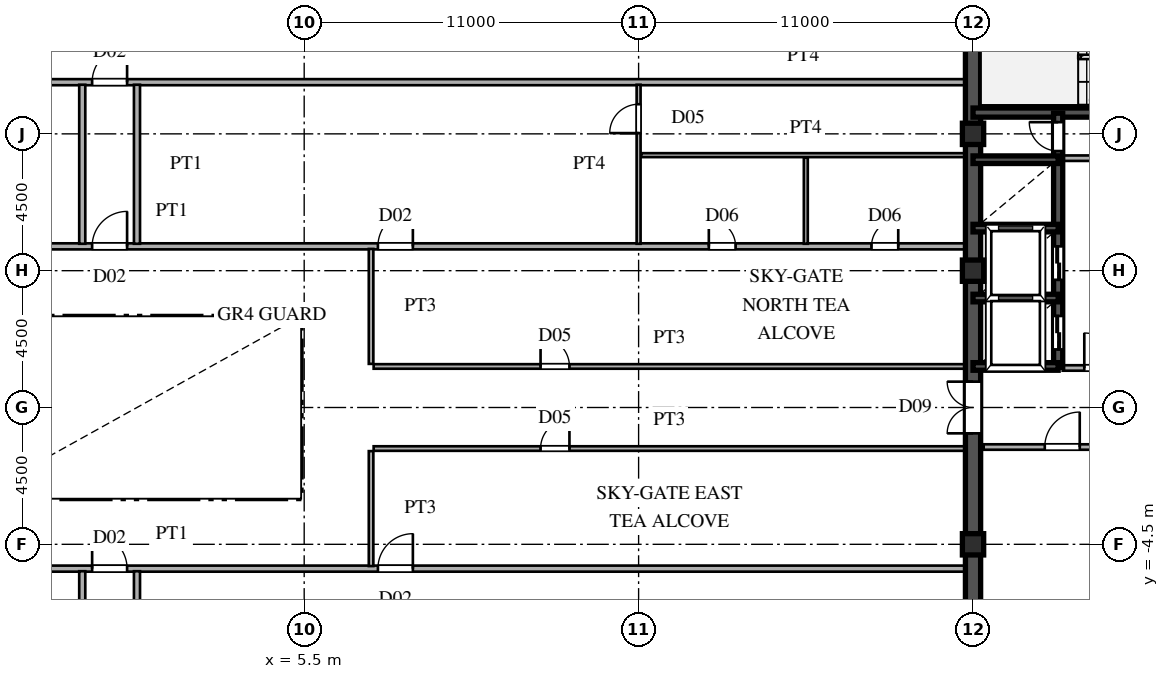
"""IFC4 building model, lengths in metres.
Left out: names, types, materials, properties, quantities, classifications, styles, units other than length and angle.
Written with IfcOpenShell. Run it as: python <this file> out.ifc"""

import sys

from ifc_helpers import new_model, si_unit, direction, frame, frame_2d, origin, origin_2d, place, context, subcontext, project, spatial, rectangle, hollow_rectangle, extrude, source, transform, mapped, element, fill, save


model = new_model("IFC4")
c1 = context("Model", 3, precision=1e-05, world=origin(), true_north=direction((0.0, 1.0)))
c2 = subcontext(c1, "Body", "Model", "MODEL_VIEW")
j1 = project(units=[si_unit("LENGTHUNIT", "METRE"), si_unit("PLANEANGLEUNIT", "RADIAN")], contexts=[c1])
p1 = place(None, origin())
s1 = spatial("IfcSite", under=j1, at=p1, CompositionType="ELEMENT")
p2 = place(p1, origin())
s2 = spatial("IfcBuilding", under=s1, at=p2, CompositionType="ELEMENT")
p3 = place(p2, frame((0.0, 0.0, 234.6)))
s3 = spatial("IfcBuildingStorey", under=s2, at=p3, CompositionType="ELEMENT", Elevation=234.6)
m1 = source(origin(), c2, "Body", "SweptSolid", [
    extrude(hollow_rectangle(XDim=0.7, YDim=0.7, WallThickness=0.03, at=origin_2d()), origin(), (0.0, 0.0, 1.0), 4.8),
])
for number, where, z_axis, x_axis in (
    (1, (27.5, -4.5, 0.0), (0.0, 0.0, 1.0), (1.0, 0.0, 0.0)),
    (2, (27.5, 4.5, 0.0), (0.0, 0.0, 1.0), (1.0, 0.0, 0.0)),
    (3, (27.5, 9.0, 0.0), (0.0, 0.0, 1.0), (1.0, 0.0, 0.0)),
):
    element("IfcColumn", number, at=place(p3, frame(where, z_axis=z_axis, x_axis=x_axis)), inside=s3, PredefinedType="COLUMN", context=c2, shape_type="MappedRepresentation", body=[
        mapped(m1, transform((0.0, 0.0, 0.0), scale=1.0)),
    ])
for number, where, z_axis, x_axis in (
    (4, (27.5, -13.5, 0.0), (0.0, 0.0, 1.0), (0.0, 1.0, 0.0)),
    (5, (27.5, 1.3, 0.0), (0.0, 0.0, 1.0), (0.0, 1.0, 0.0)),
):
    element("IfcWall", number, at=place(p3, frame(where, z_axis=z_axis, x_axis=x_axis)), inside=s3, PredefinedType="SHEAR", context=c2, shape_type="SweptSolid", body=[
        extrude(rectangle(XDim=12.2, YDim=0.5, at=frame_2d((6.1, 0.0))), origin(), (0.0, 0.0, 1.0), 4.58),
    ])
p4 = place(p3, frame((27.5, -1.3, 0.0), z_axis=(0.0, 0.0, 1.0), x_axis=(0.0, 1.0, 0.0)))
e6 = element("IfcWall", 6, at=p4, inside=s3, PredefinedType="SHEAR", context=c2, shape_type="SweptSolid", body=[
    extrude(rectangle(XDim=2.6, YDim=0.5, at=frame_2d((1.3, 0.0))), origin(), (0.0, 0.0, 1.0), 4.58),
])
p5 = place(p4, frame((0.45, 0.0, 0.0)))
e7 = element("IfcOpeningElement", 7, at=p5, cuts=e6, PredefinedType="OPENING", context=c2, shape_type="SweptSolid", body=[
    extrude(rectangle(XDim=1.7, YDim=2.35, at=frame_2d((0.85, 1.175))), frame((0.0, 0.26, 0.0), z_axis=(0.0, -1.0, 0.0), x_axis=(1.0, 0.0, 0.0)), (0.0, 0.0, 1.0), 0.52),
])
p6 = place(p3, frame((27.5, 9.7, 0.0), z_axis=(0.0, 0.0, 1.0), x_axis=(1.0, 0.0, 0.0)))
e8 = element("IfcWall", 8, at=p6, inside=s3, PredefinedType="SHEAR", context=c2, shape_type="SweptSolid", body=[
    extrude(rectangle(XDim=9.0, YDim=0.3, at=frame_2d((4.5, 0.0))), origin(), (0.0, 0.0, 1.0), 4.58),
])
p7 = place(p6, frame((7.3, 0.0, 0.0)))
e9 = element("IfcOpeningElement", 9, at=p7, cuts=e8, PredefinedType="OPENING", context=c2, shape_type="SweptSolid", body=[
    extrude(rectangle(XDim=1.1, YDim=2.2, at=frame_2d((0.55, 1.1))), frame((0.0, 0.16, 0.0), z_axis=(0.0, -1.0, 0.0), x_axis=(1.0, 0.0, 0.0)), (0.0, 0.0, 1.0), 0.32),
])
for number, where, z_axis, x_axis in (
    (10, (27.5, 1.35, 0.0), (0.0, 0.0, 1.0), (1.0, 0.0, 0.0)),
    (11, (27.5, 3.6, 0.0), (0.0, 0.0, 1.0), (1.0, 0.0, 0.0)),
    (12, (27.5, 5.9, 0.0), (0.0, 0.0, 1.0), (1.0, 0.0, 0.0)),
    (13, (27.5, 8.15, 0.0), (0.0, 0.0, 1.0), (1.0, 0.0, 0.0)),
):
    element("IfcWall", number, at=place(p3, frame(where, z_axis=z_axis, x_axis=x_axis)), inside=s3, PredefinedType="SHEAR", context=c2, shape_type="SweptSolid", body=[
        extrude(rectangle(XDim=2.8, YDim=0.25, at=frame_2d((1.4, 0.0))), origin(), (0.0, 0.0, 1.0), 4.58),
    ])
p8 = place(p3, frame((30.3, 1.32, 0.0), z_axis=(0.0, 0.0, 1.0), x_axis=(0.0, 1.0, 0.0)))
e14 = element("IfcWall", 14, at=p8, inside=s3, PredefinedType="SHEAR", context=c2, shape_type="SweptSolid", body=[
    extrude(rectangle(XDim=2.28, YDim=0.3, at=frame_2d((1.14, 0.0))), origin(), (0.0, 0.0, 1.0), 4.58),
])
p9 = place(p8, frame((0.59, 0.0, 0.0)))
e15 = element("IfcOpeningElement", 15, at=p9, cuts=e14, PredefinedType="OPENING", context=c2, shape_type="SweptSolid", body=[
    extrude(rectangle(XDim=1.1, YDim=2.2, at=frame_2d((0.55, 1.1))), frame((0.0, 0.16, 0.0), z_axis=(0.0, -1.0, 0.0), x_axis=(1.0, 0.0, 0.0)), (0.0, 0.0, 1.0), 0.32),
])
p10 = place(p3, frame((30.3, 3.6, 0.0), z_axis=(0.0, 0.0, 1.0), x_axis=(0.0, 1.0, 0.0)))
e16 = element("IfcWall", 16, at=p10, inside=s3, PredefinedType="SHEAR", context=c2, shape_type="SweptSolid", body=[
    extrude(rectangle(XDim=2.3, YDim=0.3, at=frame_2d((1.15, 0.0))), origin(), (0.0, 0.0, 1.0), 4.58),
])
p11 = place(p10, frame((0.6, 0.0, 0.0)))
e17 = element("IfcOpeningElement", 17, at=p11, cuts=e16, PredefinedType="OPENING", context=c2, shape_type="SweptSolid", body=[
    extrude(rectangle(XDim=1.1, YDim=2.2, at=frame_2d((0.55, 1.1))), frame((0.0, 0.16, 0.0), z_axis=(0.0, -1.0, 0.0), x_axis=(1.0, 0.0, 0.0)), (0.0, 0.0, 1.0), 0.32),
])
p12 = place(p3, frame((30.3, 5.9, 0.0), z_axis=(0.0, 0.0, 1.0), x_axis=(0.0, 1.0, 0.0)))
e18 = element("IfcWall", 18, at=p12, inside=s3, PredefinedType="SHEAR", context=c2, shape_type="SweptSolid", body=[
    extrude(rectangle(XDim=2.25, YDim=0.3, at=frame_2d((1.125, 0.0))), origin(), (0.0, 0.0, 1.0), 4.58),
])
p13 = place(p3, frame((30.3, 8.15, 0.0), z_axis=(0.0, 0.0, 1.0), x_axis=(0.0, 1.0, 0.0)))
e19 = element("IfcWall", 19, at=p13, inside=s3, PredefinedType="SHEAR", context=c2, shape_type="SweptSolid", body=[
    extrude(rectangle(XDim=1.53, YDim=0.3, at=frame_2d((0.765, 0.0))), origin(), (0.0, 0.0, 1.0), 4.58),
])
p14 = place(p13, frame((0.285, 0.0, 0.0)))
e20 = element("IfcOpeningElement", 20, at=p14, cuts=e19, PredefinedType="OPENING", context=c2, shape_type="SweptSolid", body=[
    extrude(rectangle(XDim=0.95, YDim=2.15, at=frame_2d((0.475, 1.075))), frame((0.0, 0.16, 0.0), z_axis=(0.0, -1.0, 0.0), x_axis=(1.0, 0.0, 0.0)), (0.0, 0.0, 1.0), 0.32),
])
p15 = place(p3, frame((30.45, 8.2, 0.0), z_axis=(0.0, 0.0, 1.0), x_axis=(1.0, 0.0, 0.0)))
e21 = element("IfcWall", 21, at=p15, inside=s3, PredefinedType="PARTITIONING", context=c2, shape_type="SweptSolid", body=[
    extrude(rectangle(XDim=5.7, YDim=0.18, at=frame_2d((2.85, 0.0))), origin(), (0.0, 0.0, 1.0), 4.58),
])
p16 = place(p3, frame((27.85, -1.3, 0.0), z_axis=(0.0, 0.0, 1.0), x_axis=(1.0, 0.0, 0.0)))
e22 = element("IfcWall", 22, at=p16, inside=s3, PredefinedType="PARTITIONING", context=c2, shape_type="SweptSolid", body=[
    extrude(rectangle(XDim=5.17, YDim=0.18, at=frame_2d((2.585, 0.0))), origin(), (0.0, 0.0, 1.0), 4.58),
])
p17 = place(p16, frame((2.01, 0.0, 0.0)))
e23 = element("IfcOpeningElement", 23, at=p17, cuts=e22, PredefinedType="OPENING", context=c2, shape_type="SweptSolid", body=[
    extrude(rectangle(XDim=1.15, YDim=2.2, at=frame_2d((0.575, 1.1))), frame((0.0, 0.1, 0.0), z_axis=(0.0, -1.0, 0.0), x_axis=(1.0, 0.0, 0.0)), (0.0, 0.0, 1.0), 0.2),
])
p18 = place(p3, frame((30.45, 1.3, 0.0), z_axis=(0.0, 0.0, 1.0), x_axis=(1.0, 0.0, 0.0)))
e24 = element("IfcWall", 24, at=p18, inside=s3, PredefinedType="PARTITIONING", context=c2, shape_type="SweptSolid", body=[
    extrude(rectangle(XDim=2.57, YDim=0.18, at=frame_2d((1.285, 0.0))), origin(), (0.0, 0.0, 1.0), 4.58),
])
p19 = place(p18, frame((0.71, 0.0, 0.0)))
e25 = element("IfcOpeningElement", 25, at=p19, cuts=e24, PredefinedType="OPENING", context=c2, shape_type="SweptSolid", body=[
    extrude(rectangle(XDim=1.15, YDim=2.2, at=frame_2d((0.575, 1.1))), frame((0.0, 0.1, 0.0), z_axis=(0.0, -1.0, 0.0), x_axis=(1.0, 0.0, 0.0)), (0.0, 0.0, 1.0), 0.2),
])
p20 = place(p3, frame((-27.245, -5.3, 0.0), z_axis=(0.0, 0.0, 1.0), x_axis=(1.0, 0.0, 0.0)))
e26 = element("IfcWall", 26, at=p20, inside=s3, PredefinedType="PARTITIONING", context=c2, shape_type="SweptSolid", body=[
    extrude(rectangle(XDim=54.49, YDim=0.2, at=frame_2d((27.245, 0.0))), origin(), (0.0, 0.0, 1.0), 4.58),
])
p21 = place(p20, frame((25.77, 0.0, 0.0)))
e27 = element("IfcOpeningElement", 27, at=p21, cuts=e26, PredefinedType="OPENING", context=c2, shape_type="SweptSolid", body=[
    extrude(rectangle(XDim=1.15, YDim=2.2, at=frame_2d((0.575, 1.1))), frame((0.0, 0.11, 0.0), z_axis=(0.0, -1.0, 0.0), x_axis=(1.0, 0.0, 0.0)), (0.0, 0.0, 1.0), 0.22),
])
p22 = place(p20, frame((17.67, 0.0, 0.0)))
e28 = element("IfcOpeningElement", 28, at=p22, cuts=e26, PredefinedType="OPENING", context=c2, shape_type="SweptSolid", body=[
    extrude(rectangle(XDim=1.15, YDim=2.2, at=frame_2d((0.575, 1.1))), frame((0.0, 0.11, 0.0), z_axis=(0.0, -1.0, 0.0), x_axis=(1.0, 0.0, 0.0)), (0.0, 0.0, 1.0), 0.22),
])
p23 = place(p20, frame((35.17, 0.0, 0.0)))
e29 = element("IfcOpeningElement", 29, at=p23, cuts=e26, PredefinedType="OPENING", context=c2, shape_type="SweptSolid", body=[
    extrude(rectangle(XDim=1.15, YDim=2.2, at=frame_2d((0.575, 1.1))), frame((0.0, 0.11, 0.0), z_axis=(0.0, -1.0, 0.0), x_axis=(1.0, 0.0, 0.0)), (0.0, 0.0, 1.0), 0.22),
])
p24 = place(p3, frame((7.785, -1.35, 0.0), z_axis=(0.0, 0.0, 1.0), x_axis=(1.0, 0.0, 0.0)))
e30 = element("IfcWall", 30, at=p24, inside=s3, PredefinedType="PARTITIONING", context=c2, shape_type="SweptSolid", body=[
    extrude(rectangle(XDim=19.46, YDim=0.15, at=frame_2d((9.73, 0.0))), origin(), (0.0, 0.0, 1.0), 4.58),
])
p25 = place(p24, frame((5.49, 0.0, 0.0)))
e31 = element("IfcOpeningElement", 31, at=p25, cuts=e30, PredefinedType="OPENING", context=c2, shape_type="SweptSolid", body=[
    extrude(rectangle(XDim=0.95, YDim=2.15, at=frame_2d((0.475, 1.075))), frame((0.0, 0.085, 0.0), z_axis=(0.0, -1.0, 0.0), x_axis=(1.0, 0.0, 0.0)), (0.0, 0.0, 1.0), 0.17),
])
p26 = place(p3, frame((7.785, 1.35, 0.0), z_axis=(0.0, 0.0, 1.0), x_axis=(1.0, 0.0, 0.0)))
e32 = element("IfcWall", 32, at=p26, inside=s3, PredefinedType="PARTITIONING", context=c2, shape_type="SweptSolid", body=[
    extrude(rectangle(XDim=19.46, YDim=0.15, at=frame_2d((9.73, 0.0))), origin(), (0.0, 0.0, 1.0), 4.58),
])
p27 = place(p26, frame((5.49, 0.0, 0.0)))
e33 = element("IfcOpeningElement", 33, at=p27, cuts=e32, PredefinedType="OPENING", context=c2, shape_type="SweptSolid", body=[
    extrude(rectangle(XDim=0.95, YDim=2.15, at=frame_2d((0.475, 1.075))), frame((0.0, 0.085, 0.0), z_axis=(0.0, -1.0, 0.0), x_axis=(1.0, 0.0, 0.0)), (0.0, 0.0, 1.0), 0.17),
])
p28 = place(p3, frame((-27.245, 5.3, 0.0), z_axis=(0.0, 0.0, 1.0), x_axis=(1.0, 0.0, 0.0)))
e34 = element("IfcWall", 34, at=p28, inside=s3, PredefinedType="PARTITIONING", context=c2, shape_type="SweptSolid", body=[
    extrude(rectangle(XDim=54.49, YDim=0.2, at=frame_2d((27.245, 0.0))), origin(), (0.0, 0.0, 1.0), 4.58),
])
p29 = place(p28, frame((25.77, 0.0, 0.0)))
e35 = element("IfcOpeningElement", 35, at=p29, cuts=e34, PredefinedType="OPENING", context=c2, shape_type="SweptSolid", body=[
    extrude(rectangle(XDim=1.15, YDim=2.2, at=frame_2d((0.575, 1.1))), frame((0.0, 0.11, 0.0), z_axis=(0.0, -1.0, 0.0), x_axis=(1.0, 0.0, 0.0)), (0.0, 0.0, 1.0), 0.22),
])
p30 = place(p28, frame((35.17, 0.0, 0.0)))
e36 = element("IfcOpeningElement", 36, at=p30, cuts=e34, PredefinedType="OPENING", context=c2, shape_type="SweptSolid", body=[
    extrude(rectangle(XDim=1.15, YDim=2.2, at=frame_2d((0.575, 1.1))), frame((0.0, 0.11, 0.0), z_axis=(0.0, -1.0, 0.0), x_axis=(1.0, 0.0, 0.0)), (0.0, 0.0, 1.0), 0.22),
])
p31 = place(p28, frame((17.67, 0.0, 0.0)))
e37 = element("IfcOpeningElement", 37, at=p31, cuts=e34, PredefinedType="OPENING", context=c2, shape_type="SweptSolid", body=[
    extrude(rectangle(XDim=1.15, YDim=2.2, at=frame_2d((0.575, 1.1))), frame((0.0, 0.11, 0.0), z_axis=(0.0, -1.0, 0.0), x_axis=(1.0, 0.0, 0.0)), (0.0, 0.0, 1.0), 0.22),
])
p32 = place(p28, frame((46.055, 0.0, 0.0)))
e38 = element("IfcOpeningElement", 38, at=p32, cuts=e34, PredefinedType="OPENING", context=c2, shape_type="SweptSolid", body=[
    extrude(rectangle(XDim=0.88, YDim=2.1, at=frame_2d((0.44, 1.05))), frame((0.0, 0.11, 0.0), z_axis=(0.0, -1.0, 0.0), x_axis=(1.0, 0.0, 0.0)), (0.0, 0.0, 1.0), 0.22),
])
p33 = place(p28, frame((51.405, 0.0, 0.0)))
e39 = element("IfcOpeningElement", 39, at=p33, cuts=e34, PredefinedType="OPENING", context=c2, shape_type="SweptSolid", body=[
    extrude(rectangle(XDim=0.88, YDim=2.1, at=frame_2d((0.44, 1.05))), frame((0.0, 0.11, 0.0), z_axis=(0.0, -1.0, 0.0), x_axis=(1.0, 0.0, 0.0)), (0.0, 0.0, 1.0), 0.22),
])
p34 = place(p3, frame((16.585, 8.3, 0.0), z_axis=(0.0, 0.0, 1.0), x_axis=(1.0, 0.0, 0.0)))
e40 = element("IfcWall", 40, at=p34, inside=s3, PredefinedType="PARTITIONING", context=c2, shape_type="SweptSolid", body=[
    extrude(rectangle(XDim=10.66, YDim=0.13, at=frame_2d((5.33, 0.0))), origin(), (0.0, 0.0, 1.0), 4.58),
])
p35 = place(p3, frame((-27.245, 10.7, 0.0), z_axis=(0.0, 0.0, 1.0), x_axis=(1.0, 0.0, 0.0)))
e41 = element("IfcWall", 41, at=p35, inside=s3, PredefinedType="PARTITIONING", context=c2, shape_type="SweptSolid", body=[
    extrude(rectangle(XDim=54.49, YDim=0.2, at=frame_2d((27.245, 0.0))), origin(), (0.0, 0.0, 1.0), 4.58),
])
p36 = place(p35, frame((25.77, 0.0, 0.0)))
e42 = element("IfcOpeningElement", 42, at=p36, cuts=e41, PredefinedType="OPENING", context=c2, shape_type="SweptSolid", body=[
    extrude(rectangle(XDim=1.15, YDim=2.2, at=frame_2d((0.575, 1.1))), frame((0.0, 0.11, 0.0), z_axis=(0.0, -1.0, 0.0), x_axis=(1.0, 0.0, 0.0)), (0.0, 0.0, 1.0), 0.22),
])
for number, where, z_axis, x_axis in (
    (43, (-1.8, -10.615, 0.0), (0.0, 0.0, 1.0), (0.0, 1.0, 0.0)),
    (44, (-1.8, 5.385, 0.0), (0.0, 0.0, 1.0), (0.0, 1.0, 0.0)),
):
    element("IfcWall", number, at=place(p3, frame(where, z_axis=z_axis, x_axis=x_axis)), inside=s3, PredefinedType="PARTITIONING", context=c2, shape_type="SweptSolid", body=[
        extrude(rectangle(XDim=5.23, YDim=0.2, at=frame_2d((2.615, 0.0))), origin(), (0.0, 0.0, 1.0), 4.58),
    ])
for number, where, z_axis, x_axis in (
    (45, (0.0, -10.615, 0.0), (0.0, 0.0, 1.0), (0.0, 1.0, 0.0)),
    (46, (0.0, 5.385, 0.0), (0.0, 0.0, 1.0), (0.0, 1.0, 0.0)),
):
    element("IfcWall", number, at=place(p3, frame(where, z_axis=z_axis, x_axis=x_axis)), inside=s3, PredefinedType="PARTITIONING", context=c2, shape_type="SweptSolid", body=[
        extrude(rectangle(XDim=5.23, YDim=0.2, at=frame_2d((2.615, 0.0))), origin(), (0.0, 0.0, 1.0), 3.48),
    ])
for number, where, z_axis, x_axis in (
    (47, (7.7, -5.215, 0.0), (0.0, 0.0, 1.0), (0.0, 1.0, 0.0)),
    (48, (7.7, 1.435, 0.0), (0.0, 0.0, 1.0), (0.0, 1.0, 0.0)),
):
    element("IfcWall", number, at=place(p3, frame(where, z_axis=z_axis, x_axis=x_axis)), inside=s3, PredefinedType="PARTITIONING", context=c2, shape_type="SweptSolid", body=[
        extrude(rectangle(XDim=3.78, YDim=0.15, at=frame_2d((1.89, 0.0))), origin(), (0.0, 0.0, 1.0), 4.58),
    ])
p37 = place(p3, frame((16.5, 5.385, 0.0), z_axis=(0.0, 0.0, 1.0), x_axis=(0.0, 1.0, 0.0)))
e49 = element("IfcWall", 49, at=p37, inside=s3, PredefinedType="PARTITIONING", context=c2, shape_type="SweptSolid", body=[
    extrude(rectangle(XDim=5.23, YDim=0.13, at=frame_2d((2.615, 0.0))), origin(), (0.0, 0.0, 1.0), 3.48),
])
p38 = place(p37, frame((3.64, 0.0, 0.0)))
e50 = element("IfcOpeningElement", 50, at=p38, cuts=e49, PredefinedType="OPENING", context=c2, shape_type="SweptSolid", body=[
    extrude(rectangle(XDim=0.95, YDim=2.15, at=frame_2d((0.475, 1.075))), frame((0.0, 0.075, 0.0), z_axis=(0.0, -1.0, 0.0), x_axis=(1.0, 0.0, 0.0)), (0.0, 0.0, 1.0), 0.15),
])
p39 = place(p3, frame((22.0, 5.385, 0.0), z_axis=(0.0, 0.0, 1.0), x_axis=(0.0, 1.0, 0.0)))
e51 = element("IfcWall", 51, at=p39, inside=s3, PredefinedType="PARTITIONING", context=c2, shape_type="SweptSolid", body=[
    extrude(rectangle(XDim=2.83, YDim=0.13, at=frame_2d((1.415, 0.0))), origin(), (0.0, 0.0, 1.0), 3.48),
])
m2 = source(origin(), c2, "Body", "SweptSolid", [
    extrude(rectangle(XDim=1.7, YDim=2.35, at=frame_2d((0.85, 1.175))), frame((0.0, 0.025, 0.0), z_axis=(0.0, -1.0, 0.0), x_axis=(1.0, 0.0, 0.0)), (0.0, 0.0, 1.0), 0.05),
])
p40 = place(p5, origin())
e52 = element("IfcDoor", 52, at=p40, inside=s3, OperationType="DOUBLE_SWING_LEFT", PredefinedType="DOOR", context=c2, shape_type="MappedRepresentation", body=[
    mapped(m2, transform((0.0, 0.0, 0.0), scale=1.0)),
])
fill(e7, e52)
m3 = source(origin(), c2, "Body", "SweptSolid", [
    extrude(rectangle(XDim=1.1, YDim=2.2, at=frame_2d((0.55, 1.1))), frame((0.0, 0.025, 0.0), z_axis=(0.0, -1.0, 0.0), x_axis=(1.0, 0.0, 0.0)), (0.0, 0.0, 1.0), 0.05),
])
p41 = place(p9, origin())
e53 = element("IfcDoor", 53, at=p41, inside=s3, OperationType="DOUBLE_DOOR_SLIDING", PredefinedType="DOOR", context=c2, shape_type="MappedRepresentation", body=[
    mapped(m3, transform((0.0, 0.0, 0.0), scale=1.0)),
])
fill(e15, e53)
p42 = place(p11, origin())
e54 = element("IfcDoor", 54, at=p42, inside=s3, OperationType="DOUBLE_DOOR_SLIDING", PredefinedType="DOOR", context=c2, shape_type="MappedRepresentation", body=[
    mapped(m3, transform((0.0, 0.0, 0.0), scale=1.0)),
])
fill(e17, e54)
m4 = source(origin(), c2, "Body", "SweptSolid", [
    extrude(rectangle(XDim=0.95, YDim=2.15, at=frame_2d((0.475, 1.075))), frame((0.0, 0.025, 0.0), z_axis=(0.0, -1.0, 0.0), x_axis=(1.0, 0.0, 0.0)), (0.0, 0.0, 1.0), 0.05),
])
p43 = place(p14, origin())
e55 = element("IfcDoor", 55, at=p43, inside=s3, OperationType="SINGLE_SWING_RIGHT", PredefinedType="DOOR", context=c2, shape_type="MappedRepresentation", body=[
    mapped(m4, transform((0.0, 0.0, 0.0), scale=1.0)),
])
fill(e20, e55)
m5 = source(origin(), c2, "Body", "SweptSolid", [
    extrude(rectangle(XDim=1.15, YDim=2.2, at=frame_2d((0.575, 1.1))), frame((0.0, 0.025, 0.0), z_axis=(0.0, -1.0, 0.0), x_axis=(1.0, 0.0, 0.0)), (0.0, 0.0, 1.0), 0.05),
])
p44 = place(p17, origin())
e56 = element("IfcDoor", 56, at=p44, inside=s3, OperationType="SINGLE_SWING_RIGHT", PredefinedType="DOOR", context=c2, shape_type="MappedRepresentation", body=[
    mapped(m5, transform((0.0, 0.0, 0.0), scale=1.0)),
])
fill(e23, e56)
p45 = place(p19, origin())
e57 = element("IfcDoor", 57, at=p45, inside=s3, OperationType="SINGLE_SWING_LEFT", PredefinedType="DOOR", context=c2, shape_type="MappedRepresentation", body=[
    mapped(m5, transform((0.0, 0.0, 0.0), scale=1.0)),
])
fill(e25, e57)
p46 = place(p21, origin())
e58 = element("IfcDoor", 58, at=p46, inside=s3, OperationType="SINGLE_SWING_LEFT", PredefinedType="DOOR", context=c2, shape_type="MappedRepresentation", body=[
    mapped(m5, transform((0.0, 0.0, 0.0), scale=1.0)),
])
fill(e27, e58)
p47 = place(p23, origin())
e59 = element("IfcDoor", 59, at=p47, inside=s3, OperationType="SINGLE_SWING_RIGHT", PredefinedType="DOOR", context=c2, shape_type="MappedRepresentation", body=[
    mapped(m5, transform((0.0, 0.0, 0.0), scale=1.0)),
])
fill(e29, e59)
m6 = source(origin(), c2, "Body", "SweptSolid", [
    extrude(rectangle(XDim=0.95, YDim=2.15, at=frame_2d((0.475, 1.075))), frame((0.0, 0.025, 0.0), z_axis=(0.0, -1.0, 0.0), x_axis=(1.0, 0.0, 0.0)), (0.0, 0.0, 1.0), 0.05),
])
p48 = place(p25, origin())
e60 = element("IfcDoor", 60, at=p48, inside=s3, OperationType="SINGLE_SWING_RIGHT", PredefinedType="DOOR", context=c2, shape_type="MappedRepresentation", body=[
    mapped(m6, transform((0.0, 0.0, 0.0), scale=1.0)),
])
fill(e31, e60)
p49 = place(p27, origin())
e61 = element("IfcDoor", 61, at=p49, inside=s3, OperationType="SINGLE_SWING_LEFT", PredefinedType="DOOR", context=c2, shape_type="MappedRepresentation", body=[
    mapped(m6, transform((0.0, 0.0, 0.0), scale=1.0)),
])
fill(e33, e61)
p50 = place(p29, origin())
e62 = element("IfcDoor", 62, at=p50, inside=s3, OperationType="SINGLE_SWING_RIGHT", PredefinedType="DOOR", context=c2, shape_type="MappedRepresentation", body=[
    mapped(m5, transform((0.0, 0.0, 0.0), scale=1.0)),
])
fill(e35, e62)
p51 = place(p30, origin())
e63 = element("IfcDoor", 63, at=p51, inside=s3, OperationType="SINGLE_SWING_RIGHT", PredefinedType="DOOR", context=c2, shape_type="MappedRepresentation", body=[
    mapped(m5, transform((0.0, 0.0, 0.0), scale=1.0)),
])
fill(e36, e63)
m7 = source(origin(), c2, "Body", "SweptSolid", [
    extrude(rectangle(XDim=0.88, YDim=2.1, at=frame_2d((0.44, 1.05))), frame((0.0, 0.025, 0.0), z_axis=(0.0, -1.0, 0.0), x_axis=(1.0, 0.0, 0.0)), (0.0, 0.0, 1.0), 0.05),
])
p52 = place(p32, origin())
e64 = element("IfcDoor", 64, at=p52, inside=s3, OperationType="SINGLE_SWING_LEFT", PredefinedType="DOOR", context=c2, shape_type="MappedRepresentation", body=[
    mapped(m7, transform((0.0, 0.0, 0.0), scale=1.0)),
])
fill(e38, e64)
p53 = place(p33, origin())
e65 = element("IfcDoor", 65, at=p53, inside=s3, OperationType="SINGLE_SWING_RIGHT", PredefinedType="DOOR", context=c2, shape_type="MappedRepresentation", body=[
    mapped(m7, transform((0.0, 0.0, 0.0), scale=1.0)),
])
fill(e39, e65)
p54 = place(p36, origin())
e66 = element("IfcDoor", 66, at=p54, inside=s3, OperationType="SINGLE_SWING_RIGHT", PredefinedType="DOOR", context=c2, shape_type="MappedRepresentation", body=[
    mapped(m5, transform((0.0, 0.0, 0.0), scale=1.0)),
])
fill(e42, e66)
p55 = place(p38, origin())
e67 = element("IfcDoor", 67, at=p55, inside=s3, OperationType="SINGLE_SWING_LEFT", PredefinedType="DOOR", context=c2, shape_type="MappedRepresentation", body=[
    mapped(m6, transform((0.0, 0.0, 0.0), scale=1.0)),
])
fill(e50, e67)
save(model, sys.argv[1])
